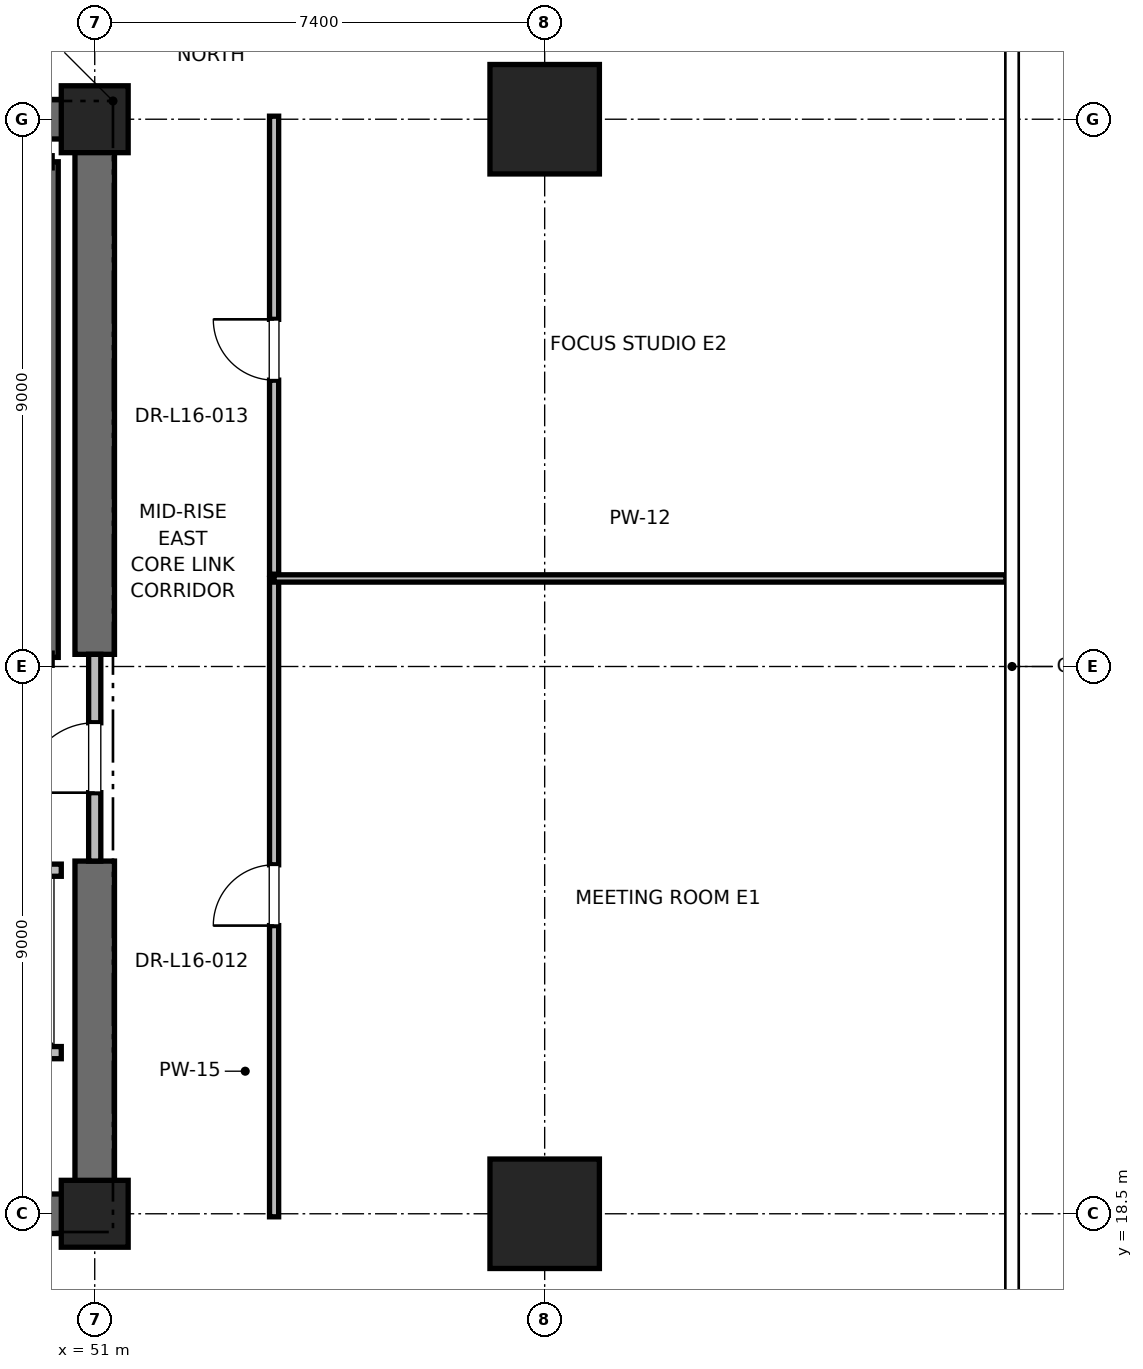
"""IFC4 building model, lengths in metres.
Left out: names, types, materials, properties, quantities, classifications, styles, units other than length and angle.
Written with IfcOpenShell. Run it as: python <this file> out.ifc"""

import sys

from ifc_helpers import new_model, si_unit, direction, frame, frame_2d, origin, origin_2d, place, context, subcontext, project, spatial, rectangle, extrude, element, fill, save


model = new_model("IFC4")
c1 = context("Model", 3, precision=1e-05, world=origin(), true_north=direction((0.0, 1.0)))
c2 = subcontext(c1, "Body", "Model", "MODEL_VIEW")
j1 = project(units=[si_unit("LENGTHUNIT", "METRE"), si_unit("PLANEANGLEUNIT", "RADIAN")], contexts=[c1])
p1 = place(None, origin())
s1 = spatial("IfcSite", under=j1, at=p1, CompositionType="ELEMENT")
p2 = place(p1, origin())
s2 = spatial("IfcBuilding", under=s1, at=p2, CompositionType="ELEMENT")
p3 = place(p2, frame((0.0, 0.0, 71.6)))
s3 = spatial("IfcBuildingStorey", under=s2, at=p3, CompositionType="ELEMENT", Elevation=71.6)
for number, where, z_axis, x_axis in (
    (1, (58.4, 18.5, 0.0), (0.0, 0.0, 1.0), (1.0, 0.0, 0.0)),
    (2, (58.4, 36.5, 0.0), (0.0, 0.0, 1.0), (1.0, 0.0, 0.0)),
):
    element("IfcColumn", number, at=place(p3, frame(where, z_axis=z_axis, x_axis=x_axis)), inside=s3, PredefinedType="COLUMN", context=c2, shape_type="SweptSolid", body=[
        extrude(rectangle(XDim=1.8, YDim=1.8, at=origin_2d()), origin(), (0.0, 0.0, 1.0), 4.0),
    ])
for number, where, z_axis, x_axis in (
    (3, (51.0, 18.5, 0.0), (0.0, 0.0, 1.0), (1.0, 0.0, 0.0)),
    (4, (51.0, 36.5, 0.0), (0.0, 0.0, 1.0), (1.0, 0.0, 0.0)),
):
    element("IfcColumn", number, at=place(p3, frame(where, z_axis=z_axis, x_axis=x_axis)), inside=s3, PredefinedType="PILASTER", context=c2, shape_type="SweptSolid", body=[
        extrude(rectangle(XDim=1.1, YDim=1.1, at=origin_2d()), origin(), (0.0, 0.0, 1.0), 4.0),
    ])
p4 = place(p3, frame((41.8, 18.5, 0.0), z_axis=(0.0, 0.0, 1.0), x_axis=(1.0, 0.0, 0.0)))
e5 = element("IfcWall", 5, at=p4, inside=s3, PredefinedType="SHEAR", context=c2, shape_type="SweptSolid", body=[
    extrude(rectangle(XDim=9.2, YDim=0.65, at=frame_2d((4.6, 0.0))), origin(), (0.0, 0.0, 1.0), 3.76),
])
for number, where, z_axis, x_axis in (
    (6, (45.2, 36.5, 0.0), (0.0, 0.0, 1.0), (1.0, 0.0, 0.0)),
    (7, (51.0, 18.5, 0.0), (0.0, 0.0, 1.0), (0.0, 1.0, 0.0)),
):
    element("IfcWall", number, at=place(p3, frame(where, z_axis=z_axis, x_axis=x_axis)), inside=s3, PredefinedType="SHEAR", context=c2, shape_type="SweptSolid", body=[
        extrude(rectangle(XDim=5.8, YDim=0.65, at=frame_2d((2.9, 0.0))), origin(), (0.0, 0.0, 1.0), 3.76),
    ])
p5 = place(p3, frame((51.0, 27.7, 0.0), z_axis=(0.0, 0.0, 1.0), x_axis=(0.0, 1.0, 0.0)))
e8 = element("IfcWall", 8, at=p5, inside=s3, PredefinedType="SHEAR", context=c2, shape_type="SweptSolid", body=[
    extrude(rectangle(XDim=8.8, YDim=0.65, at=frame_2d((4.4, 0.0))), origin(), (0.0, 0.0, 1.0), 3.76),
])
p6 = place(p3, frame((50.3, 27.65, 0.0), z_axis=(0.0, 0.0, 1.0), x_axis=(0.0, 1.0, 0.0)))
e9 = element("IfcWall", 9, at=p6, inside=s3, PredefinedType="SOLIDWALL", context=c2, shape_type="SweptSolid", body=[
    extrude(rectangle(XDim=8.15, YDim=0.2, at=frame_2d((4.075, 0.0))), origin(), (0.0, 0.0, 1.0), 3.76),
])
p7 = place(p3, frame((51.0, 24.3, 0.0), z_axis=(0.0, 0.0, 1.0), x_axis=(0.0, 1.0, 0.0)))
e10 = element("IfcWall", 10, at=p7, inside=s3, PredefinedType="PARTITIONING", context=c2, shape_type="SweptSolid", body=[
    extrude(rectangle(XDim=3.4, YDim=0.2, at=frame_2d((1.7, 0.0))), origin(), (0.0, 0.0, 1.0), 2.54),
])
p8 = place(p7, frame((1.125, 0.0, 0.0)))
e11 = element("IfcOpeningElement", 11, at=p8, cuts=e10, PredefinedType="OPENING", context=c2, shape_type="SweptSolid", body=[
    extrude(rectangle(XDim=1.15, YDim=2.2, at=frame_2d((0.575, 1.1))), frame((0.0, 0.1, 0.0), z_axis=(0.0, -1.0, 0.0), x_axis=(1.0, 0.0, 0.0)), (0.0, 0.0, 1.0), 0.2),
])
p9 = place(p3, frame((47.85, 21.15, 0.0), z_axis=(0.0, 0.0, 1.0), x_axis=(1.0, 0.0, 0.0)))
e12 = element("IfcWall", 12, at=p9, inside=s3, PredefinedType="SOLIDWALL", context=c2, shape_type="SweptSolid", body=[
    extrude(rectangle(XDim=2.6, YDim=0.2, at=frame_2d((1.3, 0.0))), origin(), (0.0, 0.0, 1.0), 3.76),
])
p10 = place(p3, frame((50.45, 24.15, 0.0), z_axis=(0.0, 0.0, 1.0), x_axis=(-1.0, 0.0, 0.0)))
e13 = element("IfcWall", 13, at=p10, inside=s3, PredefinedType="SOLIDWALL", context=c2, shape_type="SweptSolid", body=[
    extrude(rectangle(XDim=2.6, YDim=0.2, at=frame_2d((1.3, 0.0))), origin(), (0.0, 0.0, 1.0), 2.54),
])
p11 = place(p10, frame((0.75, 0.0, 0.0)))
e14 = element("IfcOpeningElement", 14, at=p11, cuts=e13, PredefinedType="OPENING", context=c2, shape_type="SweptSolid", body=[
    extrude(rectangle(XDim=1.1, YDim=2.2, at=frame_2d((0.55, 1.1))), frame((0.0, 0.1, 0.0), z_axis=(0.0, -1.0, 0.0), x_axis=(1.0, 0.0, 0.0)), (0.0, 0.0, 1.0), 0.2),
])
p12 = place(p3, frame((53.95, 18.45, 0.0), z_axis=(0.0, 0.0, 1.0), x_axis=(0.0, 1.0, 0.0)))
e15 = element("IfcWall", 15, at=p12, inside=s3, PredefinedType="PARTITIONING", context=c2, shape_type="SweptSolid", body=[
    extrude(rectangle(XDim=10.498, YDim=0.15, at=frame_2d((5.249, 0.0))), origin(), (0.0, 0.0, 1.0), 2.85),
])
p13 = place(p12, frame((4.789, 0.0, 0.0)))
e16 = element("IfcOpeningElement", 16, at=p13, cuts=e15, PredefinedType="OPENING", context=c2, shape_type="SweptSolid", body=[
    extrude(rectangle(XDim=1.0, YDim=2.15, at=frame_2d((0.5, 1.075))), frame((0.0, 0.075, 0.0), z_axis=(0.0, -1.0, 0.0), x_axis=(1.0, 0.0, 0.0)), (0.0, 0.0, 1.0), 0.15),
])
p14 = place(p3, frame((53.95, 28.948, 0.0), z_axis=(0.0, 0.0, 1.0), x_axis=(1.0, 0.0, 0.0)))
e17 = element("IfcWall", 17, at=p14, inside=s3, PredefinedType="PARTITIONING", context=c2, shape_type="SweptSolid", body=[
    extrude(rectangle(XDim=12.036, YDim=0.12, at=frame_2d((6.018, 0.0))), origin(), (0.0, 0.0, 1.0), 2.85),
])
p15 = place(p3, frame((53.95, 29.018, 0.0), z_axis=(0.0, 0.0, 1.0), x_axis=(0.0, 1.0, 0.0)))
e18 = element("IfcWall", 18, at=p15, inside=s3, PredefinedType="PARTITIONING", context=c2, shape_type="SweptSolid", body=[
    extrude(rectangle(XDim=7.532, YDim=0.15, at=frame_2d((3.766, 0.0))), origin(), (0.0, 0.0, 1.0), 2.85),
])
p16 = place(p15, frame((3.191, 0.0, 0.0)))
e19 = element("IfcOpeningElement", 19, at=p16, cuts=e18, PredefinedType="OPENING", context=c2, shape_type="SweptSolid", body=[
    extrude(rectangle(XDim=1.0, YDim=2.15, at=frame_2d((0.5, 1.075))), frame((0.0, 0.075, 0.0), z_axis=(0.0, -1.0, 0.0), x_axis=(1.0, 0.0, 0.0)), (0.0, 0.0, 1.0), 0.15),
])
p17 = place(p8, origin())
e20 = element("IfcDoor", 20, at=p17, inside=s3, OperationType="SINGLE_SWING_LEFT", PredefinedType="DOOR", context=c2, shape_type="SweptSolid", body=[
    extrude(rectangle(XDim=1.15, YDim=2.2, at=frame_2d((0.575, 1.1))), frame((0.0, 0.025, 0.0), z_axis=(0.0, -1.0, 0.0), x_axis=(1.0, 0.0, 0.0)), (0.0, 0.0, 1.0), 0.05),
])
fill(e11, e20)
p18 = place(p13, origin())
e21 = element("IfcDoor", 21, at=p18, inside=s3, OperationType="SINGLE_SWING_LEFT", PredefinedType="DOOR", context=c2, shape_type="SweptSolid", body=[
    extrude(rectangle(XDim=1.0, YDim=2.15, at=frame_2d((0.5, 1.075))), frame((0.0, 0.025, 0.0), z_axis=(0.0, -1.0, 0.0), x_axis=(1.0, 0.0, 0.0)), (0.0, 0.0, 1.0), 0.05),
])
fill(e16, e21)
p19 = place(p16, origin())
e22 = element("IfcDoor", 22, at=p19, inside=s3, OperationType="SINGLE_SWING_RIGHT", PredefinedType="DOOR", context=c2, shape_type="SweptSolid", body=[
    extrude(rectangle(XDim=1.0, YDim=2.15, at=frame_2d((0.5, 1.075))), frame((0.0, 0.025, 0.0), z_axis=(0.0, -1.0, 0.0), x_axis=(1.0, 0.0, 0.0)), (0.0, 0.0, 1.0), 0.05),
])
fill(e19, e22)
save(model, sys.argv[1])
